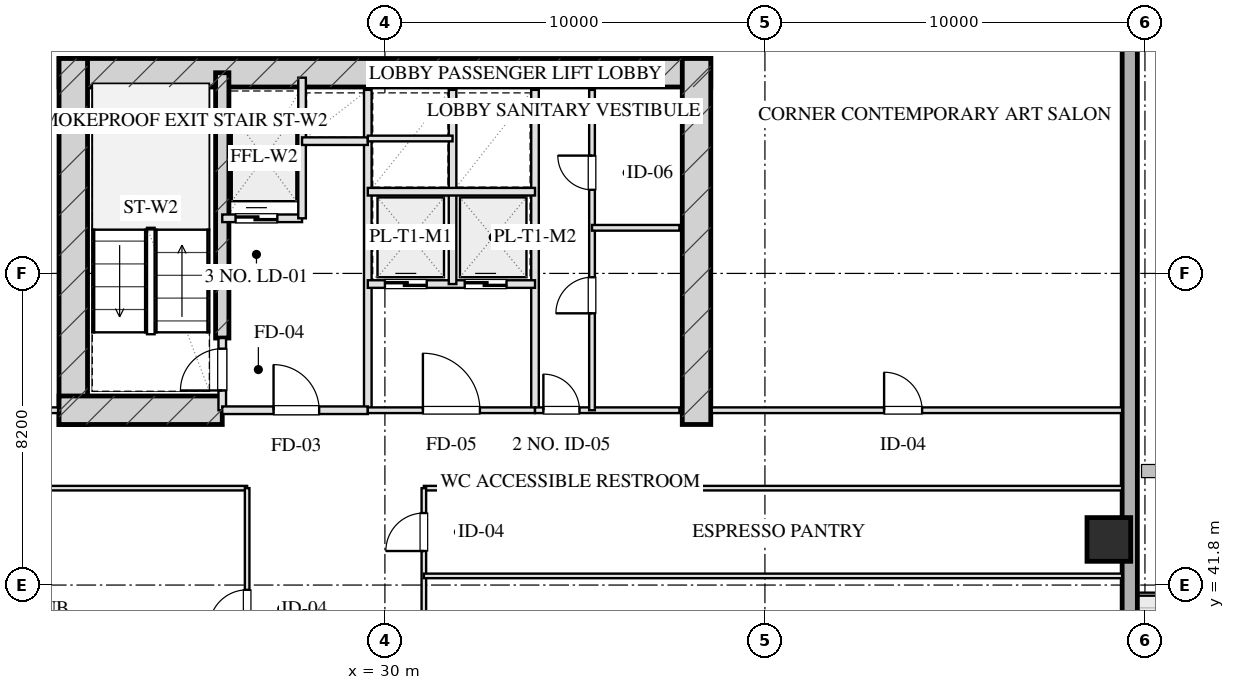
"""IFC4 building model, lengths in metres.
Left out: names, types, materials, properties, quantities, classifications, styles, units other than length and angle.
Written with IfcOpenShell. Run it as: python <this file> out.ifc"""

import sys

from ifc_helpers import new_model, si_unit, direction, frame, frame_2d, origin, origin_2d, place, context, subcontext, project, spatial, rectangle, hollow_rectangle, extrude, element, fill, save


model = new_model("IFC4")
c1 = context("Model", 3, precision=1e-05, world=origin(), true_north=direction((0.0, 1.0)))
c2 = subcontext(c1, "Body", "Model", "MODEL_VIEW")
j1 = project(units=[si_unit("LENGTHUNIT", "METRE"), si_unit("PLANEANGLEUNIT", "RADIAN")], contexts=[c1])
p1 = place(None, origin())
s1 = spatial("IfcSite", under=j1, at=p1, CompositionType="ELEMENT")
p2 = place(p1, origin())
s2 = spatial("IfcBuilding", under=s1, at=p2, CompositionType="ELEMENT")
p3 = place(p2, frame((0.0, 0.0, 57.5)))
s3 = spatial("IfcBuildingStorey", under=s2, at=p3, CompositionType="ELEMENT", Elevation=57.5)
p4 = place(p3, frame((21.425, 55.28, 0.0), z_axis=(0.0, 0.0, 1.0), x_axis=(1.0, 0.0, 0.0)))
e1 = element("IfcWall", 1, at=p4, inside=s3, PredefinedType="SHEAR", context=c2, shape_type="SweptSolid", body=[
    extrude(rectangle(XDim=17.15, YDim=0.75, at=frame_2d((8.575, 0.0))), origin(), (0.0, 0.0, 1.0), 3.45),
])
for number, where, z_axis, x_axis in (
    (2, (21.8, 46.025, 0.0), (0.0, 0.0, 1.0), (0.0, 1.0, 0.0)),
    (3, (38.2, 46.025, 0.0), (0.0, 0.0, 1.0), (0.0, 1.0, 0.0)),
):
    element("IfcWall", number, at=place(p3, frame(where, z_axis=z_axis, x_axis=x_axis)), inside=s3, PredefinedType="SHEAR", context=c2, shape_type="SweptSolid", body=[
        extrude(rectangle(XDim=9.63, YDim=0.75, at=frame_2d((4.815, 0.0))), origin(), (0.0, 0.0, 1.0), 3.45),
    ])
p5 = place(p3, frame((25.72, 48.3, 0.0), z_axis=(0.0, 0.0, 1.0), x_axis=(0.0, 1.0, 0.0)))
e4 = element("IfcWall", 4, at=p5, inside=s3, PredefinedType="SHEAR", context=c2, shape_type="SweptSolid", body=[
    extrude(rectangle(XDim=6.98, YDim=0.35, at=frame_2d((3.49, 0.0))), origin(), (0.0, 0.0, 1.0), 3.45),
])
p6 = place(p3, frame((21.425, 46.4, 0.0), z_axis=(0.0, 0.0, 1.0), x_axis=(1.0, 0.0, 0.0)))
e5 = element("IfcWall", 5, at=p6, inside=s3, PredefinedType="SHEAR", context=c2, shape_type="SweptSolid", body=[
    extrude(rectangle(XDim=4.295, YDim=0.75, at=frame_2d((2.147, 0.0))), origin(), (0.0, 0.0, 1.0), 3.45),
])
p7 = place(p3, frame((49.05, 43.0, 0.0), z_axis=(0.0, 0.0, 1.0), x_axis=(1.0, 0.0, 0.0)))
e6 = element("IfcColumn", 6, at=p7, inside=s3, PredefinedType="COLUMN", context=c2, shape_type="SweptSolid", body=[
    extrude(hollow_rectangle(XDim=1.15, YDim=1.15, WallThickness=0.04, at=origin_2d()), origin(), (0.0, 0.0, 1.0), 3.451),
])
p8 = place(p3, frame((49.6, 60.8, 0.0), z_axis=(0.0, 0.0, 1.0), x_axis=(0.0, -1.0, 0.0)))
e7 = element("IfcWall", 7, at=p8, inside=s3, PredefinedType="SOLIDWALL", context=c2, shape_type="SweptSolid", body=[
    extrude(rectangle(XDim=53.6, YDim=0.4, at=frame_2d((26.8, 0.0))), origin(), (0.0, 0.0, 1.0), 2.61),
])
p9 = place(p8, frame((23.177, 0.0, 0.0)))
e8 = element("IfcOpeningElement", 8, at=p9, cuts=e7, PredefinedType="OPENING", context=c2, shape_type="SweptSolid", body=[
    extrude(rectangle(XDim=1.1, YDim=2.15, at=frame_2d((0.55, 1.075))), frame((0.0, 0.21, 0.0), z_axis=(0.0, -1.0, 0.0), x_axis=(1.0, 0.0, 0.0)), (0.0, 0.0, 1.0), 0.42),
])
p10 = place(p3, frame((25.72, 46.4, 0.0), z_axis=(0.0, 0.0, 1.0), x_axis=(0.0, 1.0, 0.0)))
e9 = element("IfcWall", 9, at=p10, inside=s3, PredefinedType="PARTITIONING", context=c2, shape_type="SweptSolid", body=[
    extrude(rectangle(XDim=1.9, YDim=0.2, at=frame_2d((0.95, 0.0))), origin(), (0.0, 0.0, 1.0), 3.175),
])
p11 = place(p10, frame((0.52, 0.0, 0.0)))
e10 = element("IfcOpeningElement", 10, at=p11, cuts=e9, PredefinedType="OPENING", context=c2, shape_type="SweptSolid", body=[
    extrude(rectangle(XDim=1.1, YDim=2.05, at=frame_2d((0.55, 1.025))), frame((0.0, 0.11, 0.0), z_axis=(0.0, -1.0, 0.0), x_axis=(1.0, 0.0, 0.0)), (0.0, 0.0, 1.0), 0.22),
])
p12 = place(p3, frame((29.55, 46.4, 0.0), z_axis=(0.0, 0.0, 1.0), x_axis=(0.0, 1.0, 0.0)))
e11 = element("IfcWall", 11, at=p12, inside=s3, PredefinedType="PARTITIONING", context=c2, shape_type="SweptSolid", body=[
    extrude(rectangle(XDim=8.43, YDim=0.2, at=frame_2d((4.215, 0.0))), origin(), (0.0, 0.0, 1.0), 3.175),
])
p13 = place(p3, frame((25.72, 46.4, 0.0), z_axis=(0.0, 0.0, 1.0), x_axis=(1.0, 0.0, 0.0)))
e12 = element("IfcWall", 12, at=p13, inside=s3, PredefinedType="PARTITIONING", context=c2, shape_type="SweptSolid", body=[
    extrude(rectangle(XDim=3.83, YDim=0.2, at=frame_2d((1.915, 0.0))), origin(), (0.0, 0.0, 1.0), 3.175),
])
p14 = place(p13, frame((1.35, 0.0, 0.0)))
e13 = element("IfcOpeningElement", 13, at=p14, cuts=e12, PredefinedType="OPENING", context=c2, shape_type="SweptSolid", body=[
    extrude(rectangle(XDim=1.2, YDim=2.05, at=frame_2d((0.6, 1.025))), frame((0.0, 0.11, 0.0), z_axis=(0.0, -1.0, 0.0), x_axis=(1.0, 0.0, 0.0)), (0.0, 0.0, 1.0), 0.22),
])
p15 = place(p3, frame((25.72, 51.45, 0.0), z_axis=(0.0, 0.0, 1.0), x_axis=(1.0, 0.0, 0.0)))
e14 = element("IfcWall", 14, at=p15, inside=s3, PredefinedType="PARTITIONING", context=c2, shape_type="SweptSolid", body=[
    extrude(rectangle(XDim=2.1, YDim=0.2, at=frame_2d((1.05, 0.0))), origin(), (0.0, 0.0, 1.0), 3.175),
])
p16 = place(p15, frame((0.35, 0.0, 0.0)))
e15 = element("IfcOpeningElement", 15, at=p16, cuts=e14, PredefinedType="OPENING", context=c2, shape_type="SweptSolid", body=[
    extrude(rectangle(XDim=1.1, YDim=2.05, at=frame_2d((0.55, 1.025))), frame((0.0, 0.11, 0.0), z_axis=(0.0, -1.0, 0.0), x_axis=(1.0, 0.0, 0.0)), (0.0, 0.0, 1.0), 0.22),
])
p17 = place(p3, frame((27.82, 51.45, 0.0), z_axis=(0.0, 0.0, 1.0), x_axis=(0.0, 1.0, 0.0)))
e16 = element("IfcWall", 16, at=p17, inside=s3, PredefinedType="PARTITIONING", context=c2, shape_type="SweptSolid", body=[
    extrude(rectangle(XDim=3.7, YDim=0.2, at=frame_2d((1.85, 0.0))), origin(), (0.0, 0.0, 1.0), 3.175),
])
p18 = place(p3, frame((27.82, 53.48, 0.0), z_axis=(0.0, 0.0, 1.0), x_axis=(1.0, 0.0, 0.0)))
e17 = element("IfcWall", 17, at=p18, inside=s3, PredefinedType="PARTITIONING", context=c2, shape_type="SweptSolid", body=[
    extrude(rectangle(XDim=1.73, YDim=0.2, at=frame_2d((0.865, 0.0))), origin(), (0.0, 0.0, 1.0), 3.175),
])
p19 = place(p3, frame((33.95, 46.4, 0.0), z_axis=(0.0, 0.0, 1.0), x_axis=(0.0, 1.0, 0.0)))
e18 = element("IfcWall", 18, at=p19, inside=s3, PredefinedType="PARTITIONING", context=c2, shape_type="SweptSolid", body=[
    extrude(rectangle(XDim=8.43, YDim=0.2, at=frame_2d((4.215, 0.0))), origin(), (0.0, 0.0, 1.0), 3.175),
])
p20 = place(p3, frame((29.55, 46.4, 0.0), z_axis=(0.0, 0.0, 1.0), x_axis=(1.0, 0.0, 0.0)))
e19 = element("IfcWall", 19, at=p20, inside=s3, PredefinedType="PARTITIONING", context=c2, shape_type="SweptSolid", body=[
    extrude(rectangle(XDim=4.4, YDim=0.15, at=frame_2d((2.2, 0.0))), origin(), (0.0, 0.0, 1.0), 3.175),
])
p21 = place(p20, frame((1.45, 0.0, 0.0)))
e20 = element("IfcOpeningElement", 20, at=p21, cuts=e19, PredefinedType="OPENING", context=c2, shape_type="SweptSolid", body=[
    extrude(rectangle(XDim=1.5, YDim=2.05, at=frame_2d((0.75, 1.025))), frame((0.0, 0.085, 0.0), z_axis=(0.0, -1.0, 0.0), x_axis=(1.0, 0.0, 0.0)), (0.0, 0.0, 1.0), 0.17),
])
p22 = place(p3, frame((29.55, 49.72, 0.0), z_axis=(0.0, 0.0, 1.0), x_axis=(1.0, 0.0, 0.0)))
e21 = element("IfcWall", 21, at=p22, inside=s3, PredefinedType="PARTITIONING", context=c2, shape_type="SweptSolid", body=[
    extrude(rectangle(XDim=4.4, YDim=0.2, at=frame_2d((2.2, 0.0))), origin(), (0.0, 0.0, 1.0), 3.175),
])
p23 = place(p22, frame((0.45, 0.0, 0.0)))
e22 = element("IfcOpeningElement", 22, at=p23, cuts=e21, PredefinedType="OPENING", context=c2, shape_type="SweptSolid", body=[
    extrude(rectangle(XDim=1.1, YDim=2.05, at=frame_2d((0.55, 1.025))), frame((0.0, 0.11, 0.0), z_axis=(0.0, -1.0, 0.0), x_axis=(1.0, 0.0, 0.0)), (0.0, 0.0, 1.0), 0.22),
])
p24 = place(p22, frame((2.55, 0.0, 0.0)))
e23 = element("IfcOpeningElement", 23, at=p24, cuts=e21, PredefinedType="OPENING", context=c2, shape_type="SweptSolid", body=[
    extrude(rectangle(XDim=1.1, YDim=2.05, at=frame_2d((0.55, 1.025))), frame((0.0, 0.11, 0.0), z_axis=(0.0, -1.0, 0.0), x_axis=(1.0, 0.0, 0.0)), (0.0, 0.0, 1.0), 0.22),
])
p25 = place(p3, frame((31.78, 49.72, 0.0), z_axis=(0.0, 0.0, 1.0), x_axis=(0.0, 1.0, 0.0)))
e24 = element("IfcWall", 24, at=p25, inside=s3, PredefinedType="PARTITIONING", context=c2, shape_type="SweptSolid", body=[
    extrude(rectangle(XDim=5.11, YDim=0.2, at=frame_2d((2.555, 0.0))), origin(), (0.0, 0.0, 1.0), 3.175),
])
p26 = place(p3, frame((29.55, 52.15, 0.0), z_axis=(0.0, 0.0, 1.0), x_axis=(1.0, 0.0, 0.0)))
e25 = element("IfcWall", 25, at=p26, inside=s3, PredefinedType="PARTITIONING", context=c2, shape_type="SweptSolid", body=[
    extrude(rectangle(XDim=4.4, YDim=0.2, at=frame_2d((2.2, 0.0))), origin(), (0.0, 0.0, 1.0), 3.175),
])
p27 = place(p3, frame((29.55, 53.55, 0.0), z_axis=(0.0, 0.0, 1.0), x_axis=(1.0, 0.0, 0.0)))
e26 = element("IfcWall", 26, at=p27, inside=s3, PredefinedType="PARTITIONING", context=c2, shape_type="SweptSolid", body=[
    extrude(rectangle(XDim=2.23, YDim=0.15, at=frame_2d((1.115, 0.0))), origin(), (0.0, 0.0, 1.0), 3.175),
])
p28 = place(p3, frame((33.95, 46.4, 0.0), z_axis=(0.0, 0.0, 1.0), x_axis=(1.0, 0.0, 0.0)))
e27 = element("IfcWall", 27, at=p28, inside=s3, PredefinedType="PARTITIONING", context=c2, shape_type="SweptSolid", body=[
    extrude(rectangle(XDim=3.8, YDim=0.15, at=frame_2d((1.9, 0.0))), origin(), (0.0, 0.0, 1.0), 3.175),
])
p29 = place(p28, frame((0.22, 0.0, 0.0)))
e28 = element("IfcOpeningElement", 28, at=p29, cuts=e27, PredefinedType="OPENING", context=c2, shape_type="SweptSolid", body=[
    extrude(rectangle(XDim=0.95, YDim=2.05, at=frame_2d((0.475, 1.025))), frame((0.0, 0.085, 0.0), z_axis=(0.0, -1.0, 0.0), x_axis=(1.0, 0.0, 0.0)), (0.0, 0.0, 1.0), 0.17),
])
p30 = place(p3, frame((35.45, 46.4, 0.0), z_axis=(0.0, 0.0, 1.0), x_axis=(0.0, 1.0, 0.0)))
e29 = element("IfcWall", 29, at=p30, inside=s3, PredefinedType="PARTITIONING", context=c2, shape_type="SweptSolid", body=[
    extrude(rectangle(XDim=8.43, YDim=0.15, at=frame_2d((4.215, 0.0))), origin(), (0.0, 0.0, 1.0), 2.815),
])
p31 = place(p30, frame((2.55, 0.0, 0.0)))
e30 = element("IfcOpeningElement", 30, at=p31, cuts=e29, PredefinedType="OPENING", context=c2, shape_type="SweptSolid", body=[
    extrude(rectangle(XDim=0.95, YDim=2.05, at=frame_2d((0.475, 1.025))), frame((0.0, 0.085, 0.0), z_axis=(0.0, -1.0, 0.0), x_axis=(1.0, 0.0, 0.0)), (0.0, 0.0, 1.0), 0.17),
])
p32 = place(p30, frame((5.8, 0.0, 0.0)))
e31 = element("IfcOpeningElement", 31, at=p32, cuts=e29, PredefinedType="OPENING", context=c2, shape_type="SweptSolid", body=[
    extrude(rectangle(XDim=0.9, YDim=2.05, at=frame_2d((0.45, 1.025))), frame((0.0, 0.085, 0.0), z_axis=(0.0, -1.0, 0.0), x_axis=(1.0, 0.0, 0.0)), (0.0, 0.0, 1.0), 0.17),
])
p33 = place(p3, frame((35.45, 51.2, 0.0), z_axis=(0.0, 0.0, 1.0), x_axis=(1.0, 0.0, 0.0)))
e32 = element("IfcWall", 32, at=p33, inside=s3, PredefinedType="PARTITIONING", context=c2, shape_type="SweptSolid", body=[
    extrude(rectangle(XDim=2.3, YDim=0.15, at=frame_2d((1.15, 0.0))), origin(), (0.0, 0.0, 1.0), 3.175),
])
p34 = place(p3, frame((10.6, 46.4, 0.0), z_axis=(0.0, 0.0, 1.0), x_axis=(1.0, 0.0, 0.0)))
e33 = element("IfcWall", 33, at=p34, inside=s3, PredefinedType="PARTITIONING", context=c2, shape_type="SweptSolid", body=[
    extrude(rectangle(XDim=10.8, YDim=0.15, at=frame_2d((5.4, 0.0))), origin(), (0.0, 0.0, 1.0), 3.175),
])
p35 = place(p34, frame((4.536, 0.0, 0.0)))
e34 = element("IfcOpeningElement", 34, at=p35, cuts=e33, PredefinedType="OPENING", context=c2, shape_type="SweptSolid", body=[
    extrude(rectangle(XDim=1.05, YDim=2.05, at=frame_2d((0.525, 1.025))), frame((0.0, 0.085, 0.0), z_axis=(0.0, -1.0, 0.0), x_axis=(1.0, 0.0, 0.0)), (0.0, 0.0, 1.0), 0.17),
])
p36 = place(p3, frame((38.6, 46.4, 0.0), z_axis=(0.0, 0.0, 1.0), x_axis=(1.0, 0.0, 0.0)))
e35 = element("IfcWall", 35, at=p36, inside=s3, PredefinedType="PARTITIONING", context=c2, shape_type="SweptSolid", body=[
    extrude(rectangle(XDim=10.8, YDim=0.15, at=frame_2d((5.4, 0.0))), origin(), (0.0, 0.0, 1.0), 3.175),
])
p37 = place(p36, frame((4.536, 0.0, 0.0)))
e36 = element("IfcOpeningElement", 36, at=p37, cuts=e35, PredefinedType="OPENING", context=c2, shape_type="SweptSolid", body=[
    extrude(rectangle(XDim=1.0, YDim=2.05, at=frame_2d((0.5, 1.025))), frame((0.0, 0.085, 0.0), z_axis=(0.0, -1.0, 0.0), x_axis=(1.0, 0.0, 0.0)), (0.0, 0.0, 1.0), 0.17),
])
p38 = place(p3, frame((10.6, 44.35, 0.0), z_axis=(0.0, 0.0, 1.0), x_axis=(1.0, 0.0, 0.0)))
e37 = element("IfcWall", 37, at=p38, inside=s3, PredefinedType="PARTITIONING", context=c2, shape_type="SweptSolid", body=[
    extrude(rectangle(XDim=15.775, YDim=0.12, at=frame_2d((7.887, 0.0))), origin(), (0.0, 0.0, 1.0), 3.175),
])
p39 = place(p3, frame((31.025, 44.35, 0.0), z_axis=(0.0, 0.0, 1.0), x_axis=(1.0, 0.0, 0.0)))
e38 = element("IfcWall", 38, at=p39, inside=s3, PredefinedType="PARTITIONING", context=c2, shape_type="SweptSolid", body=[
    extrude(rectangle(XDim=18.375, YDim=0.12, at=frame_2d((9.188, 0.0))), origin(), (0.0, 0.0, 1.0), 3.175),
])
p40 = place(p3, frame((26.375, 23.65, 0.0), z_axis=(0.0, 0.0, 1.0), x_axis=(0.0, 1.0, 0.0)))
e39 = element("IfcWall", 39, at=p40, inside=s3, PredefinedType="PARTITIONING", context=c2, shape_type="SweptSolid", body=[
    extrude(rectangle(XDim=20.7, YDim=0.12, at=frame_2d((10.35, 0.0))), origin(), (0.0, 0.0, 1.0), 3.175),
])
p41 = place(p40, frame((2.518, 0.0, 0.0)))
e40 = element("IfcOpeningElement", 40, at=p41, cuts=e39, PredefinedType="OPENING", context=c2, shape_type="SweptSolid", body=[
    extrude(rectangle(XDim=1.0, YDim=2.05, at=frame_2d((0.5, 1.025))), frame((0.0, 0.07, 0.0), z_axis=(0.0, -1.0, 0.0), x_axis=(1.0, 0.0, 0.0)), (0.0, 0.0, 1.0), 0.14),
])
p42 = place(p40, frame((9.692, 0.0, 0.0)))
e41 = element("IfcOpeningElement", 41, at=p42, cuts=e39, PredefinedType="OPENING", context=c2, shape_type="SweptSolid", body=[
    extrude(rectangle(XDim=1.0, YDim=2.05, at=frame_2d((0.5, 1.025))), frame((0.0, 0.07, 0.0), z_axis=(0.0, -1.0, 0.0), x_axis=(1.0, 0.0, 0.0)), (0.0, 0.0, 1.0), 0.14),
])
p43 = place(p40, frame((17.025, 0.0, 0.0)))
e42 = element("IfcOpeningElement", 42, at=p43, cuts=e39, PredefinedType="OPENING", context=c2, shape_type="SweptSolid", body=[
    extrude(rectangle(XDim=1.0, YDim=2.05, at=frame_2d((0.5, 1.025))), frame((0.0, 0.07, 0.0), z_axis=(0.0, -1.0, 0.0), x_axis=(1.0, 0.0, 0.0)), (0.0, 0.0, 1.0), 0.14),
])
p44 = place(p3, frame((31.025, 23.65, 0.0), z_axis=(0.0, 0.0, 1.0), x_axis=(0.0, 1.0, 0.0)))
e43 = element("IfcWall", 43, at=p44, inside=s3, PredefinedType="PARTITIONING", context=c2, shape_type="SweptSolid", body=[
    extrude(rectangle(XDim=20.7, YDim=0.12, at=frame_2d((10.35, 0.0))), origin(), (0.0, 0.0, 1.0), 3.175),
])
p45 = place(p44, frame((0.775, 0.0, 0.0)))
e44 = element("IfcOpeningElement", 44, at=p45, cuts=e43, PredefinedType="OPENING", context=c2, shape_type="SweptSolid", body=[
    extrude(rectangle(XDim=0.85, YDim=2.05, at=frame_2d((0.425, 1.025))), frame((0.0, 0.07, 0.0), z_axis=(0.0, -1.0, 0.0), x_axis=(1.0, 0.0, 0.0)), (0.0, 0.0, 1.0), 0.14),
])
p46 = place(p44, frame((3.95, 0.0, 0.0)))
e45 = element("IfcOpeningElement", 45, at=p46, cuts=e43, PredefinedType="OPENING", context=c2, shape_type="SweptSolid", body=[
    extrude(rectangle(XDim=1.0, YDim=2.05, at=frame_2d((0.5, 1.025))), frame((0.0, 0.07, 0.0), z_axis=(0.0, -1.0, 0.0), x_axis=(1.0, 0.0, 0.0)), (0.0, 0.0, 1.0), 0.14),
])
p47 = place(p44, frame((8.455, 0.0, 0.0)))
e46 = element("IfcOpeningElement", 46, at=p47, cuts=e43, PredefinedType="OPENING", context=c2, shape_type="SweptSolid", body=[
    extrude(rectangle(XDim=1.05, YDim=2.05, at=frame_2d((0.525, 1.025))), frame((0.0, 0.07, 0.0), z_axis=(0.0, -1.0, 0.0), x_axis=(1.0, 0.0, 0.0)), (0.0, 0.0, 1.0), 0.14),
])
p48 = place(p44, frame((12.923, 0.0, 0.0)))
e47 = element("IfcOpeningElement", 47, at=p48, cuts=e43, PredefinedType="OPENING", context=c2, shape_type="SweptSolid", body=[
    extrude(rectangle(XDim=1.0, YDim=2.05, at=frame_2d((0.5, 1.025))), frame((0.0, 0.07, 0.0), z_axis=(0.0, -1.0, 0.0), x_axis=(1.0, 0.0, 0.0)), (0.0, 0.0, 1.0), 0.14),
])
p49 = place(p44, frame((16.338, 0.0, 0.0)))
e48 = element("IfcOpeningElement", 48, at=p49, cuts=e43, PredefinedType="OPENING", context=c2, shape_type="SweptSolid", body=[
    extrude(rectangle(XDim=1.0, YDim=2.05, at=frame_2d((0.5, 1.025))), frame((0.0, 0.07, 0.0), z_axis=(0.0, -1.0, 0.0), x_axis=(1.0, 0.0, 0.0)), (0.0, 0.0, 1.0), 0.14),
])
p50 = place(p44, frame((19.045, 0.0, 0.0)))
e49 = element("IfcOpeningElement", 49, at=p50, cuts=e43, PredefinedType="OPENING", context=c2, shape_type="SweptSolid", body=[
    extrude(rectangle(XDim=1.0, YDim=2.05, at=frame_2d((0.5, 1.025))), frame((0.0, 0.07, 0.0), z_axis=(0.0, -1.0, 0.0), x_axis=(1.0, 0.0, 0.0)), (0.0, 0.0, 1.0), 0.14),
])
p51 = place(p3, frame((31.025, 42.041, 0.0), z_axis=(0.0, 0.0, 1.0), x_axis=(1.0, 0.0, 0.0)))
e50 = element("IfcWall", 50, at=p51, inside=s3, PredefinedType="PARTITIONING", context=c2, shape_type="SweptSolid", body=[
    extrude(rectangle(XDim=18.375, YDim=0.12, at=frame_2d((9.188, 0.0))), origin(), (0.0, 0.0, 1.0), 3.175),
])
p52 = place(p11, origin())
e51 = element("IfcDoor", 51, at=p52, inside=s3, OperationType="SINGLE_SWING_LEFT", PredefinedType="DOOR", context=c2, shape_type="SweptSolid", body=[
    extrude(rectangle(XDim=1.1, YDim=2.05, at=frame_2d((0.55, 1.025))), frame((0.0, 0.025, 0.0), z_axis=(0.0, -1.0, 0.0), x_axis=(1.0, 0.0, 0.0)), (0.0, 0.0, 1.0), 0.05),
])
fill(e10, e51)
p53 = place(p14, origin())
e52 = element("IfcDoor", 52, at=p53, inside=s3, OperationType="SINGLE_SWING_LEFT", PredefinedType="DOOR", context=c2, shape_type="SweptSolid", body=[
    extrude(rectangle(XDim=1.2, YDim=2.05, at=frame_2d((0.6, 1.025))), frame((0.0, 0.025, 0.0), z_axis=(0.0, -1.0, 0.0), x_axis=(1.0, 0.0, 0.0)), (0.0, 0.0, 1.0), 0.05),
])
fill(e13, e52)
p54 = place(p16, origin())
e53 = element("IfcDoor", 53, at=p54, inside=s3, OperationType="DOUBLE_DOOR_SLIDING", PredefinedType="DOOR", context=c2, shape_type="SweptSolid", body=[
    extrude(rectangle(XDim=1.1, YDim=2.05, at=frame_2d((0.55, 1.025))), frame((0.0, 0.025, 0.0), z_axis=(0.0, -1.0, 0.0), x_axis=(1.0, 0.0, 0.0)), (0.0, 0.0, 1.0), 0.05),
])
fill(e15, e53)
p55 = place(p21, origin())
e54 = element("IfcDoor", 54, at=p55, inside=s3, OperationType="SINGLE_SWING_LEFT", PredefinedType="DOOR", context=c2, shape_type="SweptSolid", body=[
    extrude(rectangle(XDim=1.5, YDim=2.05, at=frame_2d((0.75, 1.025))), frame((0.0, 0.025, 0.0), z_axis=(0.0, -1.0, 0.0), x_axis=(1.0, 0.0, 0.0)), (0.0, 0.0, 1.0), 0.05),
])
fill(e20, e54)
p56 = place(p23, origin())
e55 = element("IfcDoor", 55, at=p56, inside=s3, OperationType="DOUBLE_DOOR_SLIDING", PredefinedType="DOOR", context=c2, shape_type="SweptSolid", body=[
    extrude(rectangle(XDim=1.1, YDim=2.05, at=frame_2d((0.55, 1.025))), frame((0.0, 0.025, 0.0), z_axis=(0.0, -1.0, 0.0), x_axis=(1.0, 0.0, 0.0)), (0.0, 0.0, 1.0), 0.05),
])
fill(e22, e55)
p57 = place(p24, origin())
e56 = element("IfcDoor", 56, at=p57, inside=s3, OperationType="DOUBLE_DOOR_SLIDING", PredefinedType="DOOR", context=c2, shape_type="SweptSolid", body=[
    extrude(rectangle(XDim=1.1, YDim=2.05, at=frame_2d((0.55, 1.025))), frame((0.0, 0.025, 0.0), z_axis=(0.0, -1.0, 0.0), x_axis=(1.0, 0.0, 0.0)), (0.0, 0.0, 1.0), 0.05),
])
fill(e23, e56)
p58 = place(p29, origin())
e57 = element("IfcDoor", 57, at=p58, inside=s3, OperationType="SINGLE_SWING_LEFT", PredefinedType="DOOR", context=c2, shape_type="SweptSolid", body=[
    extrude(rectangle(XDim=0.95, YDim=2.05, at=frame_2d((0.475, 1.025))), frame((0.0, 0.025, 0.0), z_axis=(0.0, -1.0, 0.0), x_axis=(1.0, 0.0, 0.0)), (0.0, 0.0, 1.0), 0.05),
])
fill(e28, e57)
p59 = place(p31, origin())
e58 = element("IfcDoor", 58, at=p59, inside=s3, OperationType="SINGLE_SWING_LEFT", PredefinedType="DOOR", context=c2, shape_type="SweptSolid", body=[
    extrude(rectangle(XDim=0.95, YDim=2.05, at=frame_2d((0.475, 1.025))), frame((0.0, 0.025, 0.0), z_axis=(0.0, -1.0, 0.0), x_axis=(1.0, 0.0, 0.0)), (0.0, 0.0, 1.0), 0.05),
])
fill(e30, e58)
p60 = place(p32, origin())
e59 = element("IfcDoor", 59, at=p60, inside=s3, OperationType="SINGLE_SWING_RIGHT", PredefinedType="DOOR", context=c2, shape_type="SweptSolid", body=[
    extrude(rectangle(XDim=0.9, YDim=2.05, at=frame_2d((0.45, 1.025))), frame((0.0, 0.025, 0.0), z_axis=(0.0, -1.0, 0.0), x_axis=(1.0, 0.0, 0.0)), (0.0, 0.0, 1.0), 0.05),
])
fill(e31, e59)
p61 = place(p37, origin())
e60 = element("IfcDoor", 60, at=p61, inside=s3, OperationType="SINGLE_SWING_LEFT", PredefinedType="DOOR", context=c2, shape_type="SweptSolid", body=[
    extrude(rectangle(XDim=1.0, YDim=2.05, at=frame_2d((0.5, 1.025))), frame((0.0, 0.025, 0.0), z_axis=(0.0, -1.0, 0.0), x_axis=(1.0, 0.0, 0.0)), (0.0, 0.0, 1.0), 0.05),
])
fill(e36, e60)
p62 = place(p43, origin())
e61 = element("IfcDoor", 61, at=p62, inside=s3, OperationType="SINGLE_SWING_LEFT", PredefinedType="DOOR", context=c2, shape_type="SweptSolid", body=[
    extrude(rectangle(XDim=1.0, YDim=2.05, at=frame_2d((0.5, 1.025))), frame((0.0, 0.025, 0.0), z_axis=(0.0, -1.0, 0.0), x_axis=(1.0, 0.0, 0.0)), (0.0, 0.0, 1.0), 0.05),
])
fill(e42, e61)
p63 = place(p50, origin())
e62 = element("IfcDoor", 62, at=p63, inside=s3, OperationType="SINGLE_SWING_LEFT", PredefinedType="DOOR", context=c2, shape_type="SweptSolid", body=[
    extrude(rectangle(XDim=1.0, YDim=2.05, at=frame_2d((0.5, 1.025))), frame((0.0, 0.025, 0.0), z_axis=(0.0, -1.0, 0.0), x_axis=(1.0, 0.0, 0.0)), (0.0, 0.0, 1.0), 0.05),
])
fill(e49, e62)
save(model, sys.argv[1])
